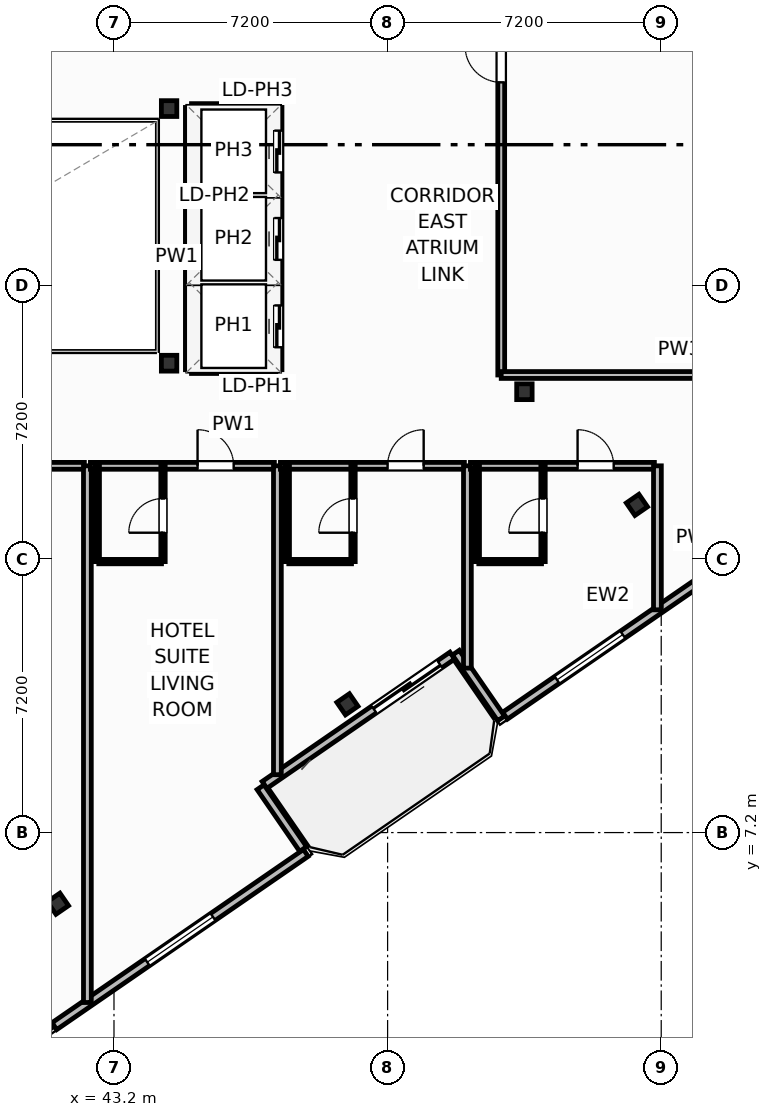
"""IFC4 building model, lengths in metres.
Left out: names, types, materials, properties, quantities, classifications, styles, units other than length and angle.
Written with IfcOpenShell. Run it as: python <this file> out.ifc"""

import sys

from ifc_helpers import new_model, si_unit, direction, frame, frame_2d, origin, origin_2d, place, context, subcontext, project, spatial, rectangle, i_section, extrude, element, fill, save


model = new_model("IFC4")
c1 = context("Model", 3, precision=1e-05, world=origin(), true_north=direction((0.0, 1.0)))
c2 = subcontext(c1, "Body", "Model", "MODEL_VIEW")
j1 = project(units=[si_unit("LENGTHUNIT", "METRE"), si_unit("PLANEANGLEUNIT", "RADIAN")], contexts=[c1])
p1 = place(None, origin())
s1 = spatial("IfcSite", under=j1, at=p1, CompositionType="ELEMENT")
p2 = place(p1, origin())
s2 = spatial("IfcBuilding", under=s1, at=p2, CompositionType="ELEMENT")
p3 = place(p2, frame((0.0, 0.0, 280.4)))
s3 = spatial("IfcBuildingStorey", under=s2, at=p3, CompositionType="ELEMENT", Elevation=280.4)
for number, where, z_axis, x_axis in (
    (1, (44.65, 19.55, 0.0), (0.0, 0.0, 1.0), (1.0, 0.0, 0.0)),
    (2, (44.65, 26.25, 0.0), (0.0, 0.0, 1.0), (1.0, 0.0, 0.0)),
    (3, (54.0, 18.8, 0.0), (0.0, 0.0, 1.0), (1.0, 0.0, 0.0)),
):
    element("IfcColumn", number, at=place(p3, frame(where, z_axis=z_axis, x_axis=x_axis)), inside=s3, PredefinedType="COLUMN", context=c2, shape_type="SweptSolid", body=[
        extrude(i_section(OverallWidth=0.406, OverallDepth=0.416, WebThickness=0.03, FlangeThickness=0.048, FilletRadius=0.025, at=origin_2d()), origin(), (0.0, 0.0, 1.0), 3.7),
    ])
for number, where, z_axis, x_axis in (
    (4, (41.725, 5.328, 0.0), (0.0, 0.0, 1.0), (0.824, 0.567, 0.0)),
    (5, (49.343, 10.575, 0.0), (0.0, 0.0, 1.0), (0.824, 0.567, 0.0)),
    (6, (56.96, 15.823, 0.0), (0.0, 0.0, 1.0), (0.824, 0.567, 0.0)),
):
    element("IfcColumn", number, at=place(p3, frame(where, z_axis=z_axis, x_axis=x_axis)), inside=s3, PredefinedType="COLUMN", context=c2, shape_type="SweptSolid", body=[
        extrude(i_section(OverallWidth=0.401, OverallDepth=0.399, WebThickness=0.025, FlangeThickness=0.04, FilletRadius=0.022, at=origin_2d()), origin(), (0.0, 0.0, 1.0), 3.7),
    ])
p4 = place(p3, frame((52.103, 11.857, 0.0), z_axis=(0.0, 0.0, 1.0), x_axis=(-0.823534636215, -0.567265989598, 0.0)))
e7 = element("IfcWall", 7, at=p4, inside=s3, PredefinedType="SOLIDWALL", context=c2, shape_type="SweptSolid", body=[
    extrude(rectangle(XDim=6.0, YDim=0.22, at=frame_2d((3.0, 0.0))), origin(), (0.0, 0.0, 1.0), 2.73),
])
p5 = place(p4, frame((0.4, 0.0, 0.0)))
e8 = element("IfcOpeningElement", 8, at=p5, cuts=e7, PredefinedType="OPENING", context=c2, shape_type="SweptSolid", body=[
    extrude(rectangle(XDim=2.1, YDim=2.3, at=frame_2d((1.05, 1.15))), frame((0.0, 0.12, 0.0), z_axis=(0.0, -1.0, 0.0), x_axis=(1.0, 0.0, 0.0)), (0.0, 0.0, 1.0), 0.24),
])
p6 = place(p3, frame((40.337, 3.765, 0.0), z_axis=(0.0, 0.0, 1.0), x_axis=(0.567352541689, -0.823475010816, 0.0)))
e9 = element("IfcWall", 9, at=p6, inside=s3, PredefinedType="SOLIDWALL", context=c2, shape_type="SweptSolid", body=[
    extrude(rectangle(XDim=2.1, YDim=0.22, at=frame_2d((1.05, 0.0))), origin(), (0.0, 0.0, 1.0), 2.73),
])
p7 = place(p3, frame((41.631, 2.106, 0.0), z_axis=(0.0, 0.0, 1.0), x_axis=(0.823530942962, 0.56727135128, 0.0)))
e10 = element("IfcWall", 10, at=p7, inside=s3, PredefinedType="SOLIDWALL", context=c2, shape_type="SweptSolid", body=[
    extrude(rectangle(XDim=8.035, YDim=0.22, at=frame_2d((4.018, 0.0))), origin(), (0.0, 0.0, 1.0), 2.73),
])
p8 = place(p7, frame((2.968, 0.0, 0.8)))
e11 = element("IfcOpeningElement", 11, at=p8, cuts=e10, PredefinedType="OPENING", context=c2, shape_type="SweptSolid", body=[
    extrude(rectangle(XDim=2.1, YDim=1.75, at=frame_2d((1.05, 0.875))), frame((0.0, 0.12, 0.0), z_axis=(0.0, -1.0, 0.0), x_axis=(1.0, 0.0, 0.0)), (0.0, 0.0, 1.0), 0.24),
])
p9 = place(p3, frame((48.177, 6.767, 0.0), z_axis=(0.0, 0.0, 1.0), x_axis=(-0.567273565974, 0.823529417415, 0.0)))
e12 = element("IfcWall", 12, at=p9, inside=s3, PredefinedType="SOLIDWALL", context=c2, shape_type="SweptSolid", body=[
    extrude(rectangle(XDim=1.975, YDim=0.22, at=frame_2d((0.988, 0.0))), origin(), (0.0, 0.0, 1.0), 2.73),
])
p10 = place(p3, frame((52.196, 11.933, 0.0), z_axis=(0.0, 0.0, 1.0), x_axis=(0.56729822855, -0.823512428494, 0.0)))
e13 = element("IfcWall", 13, at=p10, inside=s3, PredefinedType="SOLIDWALL", context=c2, shape_type="SweptSolid", body=[
    extrude(rectangle(XDim=2.1, YDim=0.22, at=frame_2d((1.05, 0.0))), origin(), (0.0, 0.0, 1.0), 2.73),
])
p11 = place(p3, frame((53.49, 10.275, 0.0), z_axis=(0.0, 0.0, 1.0), x_axis=(0.823530942962, 0.56727135128, 0.0)))
e14 = element("IfcWall", 14, at=p11, inside=s3, PredefinedType="SOLIDWALL", context=c2, shape_type="SweptSolid", body=[
    extrude(rectangle(XDim=8.035, YDim=0.22, at=frame_2d((4.018, 0.0))), origin(), (0.0, 0.0, 1.0), 2.73),
])
p12 = place(p11, frame((1.662, 0.0, 0.8)))
e15 = element("IfcOpeningElement", 15, at=p12, cuts=e14, PredefinedType="OPENING", context=c2, shape_type="SweptSolid", body=[
    extrude(rectangle(XDim=2.1, YDim=1.75, at=frame_2d((1.05, 0.875))), frame((0.0, 0.12, 0.0), z_axis=(0.0, -1.0, 0.0), x_axis=(1.0, 0.0, 0.0)), (0.0, 0.0, 1.0), 0.24),
])
p13 = place(p3, frame((37.58, 16.85, 0.0), z_axis=(0.0, 0.0, 1.0), x_axis=(1.0, 0.0, 0.0)))
e16 = element("IfcWall", 16, at=p13, inside=s3, PredefinedType="PARTITIONING", context=c2, shape_type="SweptSolid", body=[
    extrude(rectangle(XDim=4.84, YDim=0.18, at=frame_2d((2.42, 0.0))), origin(), (0.0, 0.0, 1.0), 3.45),
])
p14 = place(p13, frame((2.819, 0.0, 0.0)))
e17 = element("IfcOpeningElement", 17, at=p14, cuts=e16, PredefinedType="OPENING", context=c2, shape_type="SweptSolid", body=[
    extrude(rectangle(XDim=0.95, YDim=2.15, at=frame_2d((0.475, 1.075))), frame((0.0, 0.1, 0.0), z_axis=(0.0, -1.0, 0.0), x_axis=(1.0, 0.0, 0.0)), (0.0, 0.0, 1.0), 0.2),
])
p15 = place(p3, frame((42.5, 2.729, 0.0), z_axis=(0.0, 0.0, 1.0), x_axis=(0.0, 1.0, 0.0)))
e18 = element("IfcWall", 18, at=p15, inside=s3, PredefinedType="PARTITIONING", context=c2, shape_type="SweptSolid", body=[
    extrude(rectangle(XDim=14.121, YDim=0.205, at=frame_2d((7.061, 0.0))), origin(), (0.0, 0.0, 1.0), 2.739),
])
p16 = place(p3, frame((42.58, 16.85, 0.0), z_axis=(0.0, 0.0, 1.0), x_axis=(1.0, 0.0, 0.0)))
e19 = element("IfcWall", 19, at=p16, inside=s3, PredefinedType="PARTITIONING", context=c2, shape_type="SweptSolid", body=[
    extrude(rectangle(XDim=4.84, YDim=0.18, at=frame_2d((2.42, 0.0))), origin(), (0.0, 0.0, 1.0), 3.45),
])
p17 = place(p16, frame((2.819, 0.0, 0.0)))
e20 = element("IfcOpeningElement", 20, at=p17, cuts=e19, PredefinedType="OPENING", context=c2, shape_type="SweptSolid", body=[
    extrude(rectangle(XDim=0.95, YDim=2.15, at=frame_2d((0.475, 1.075))), frame((0.0, 0.1, 0.0), z_axis=(0.0, -1.0, 0.0), x_axis=(1.0, 0.0, 0.0)), (0.0, 0.0, 1.0), 0.2),
])
p18 = place(p3, frame((42.8, 14.33, 0.0), z_axis=(0.0, 0.0, 1.0), x_axis=(1.0, 0.0, 0.0)))
e21 = element("IfcWall", 21, at=p18, inside=s3, PredefinedType="PARTITIONING", context=c2, shape_type="SweptSolid", body=[
    extrude(rectangle(XDim=1.65, YDim=0.115, at=frame_2d((0.825, 0.0))), origin(), (0.0, 0.0, 1.0), 3.45),
])
p19 = place(p3, frame((44.49, 14.33, 0.0), z_axis=(0.0, 0.0, 1.0), x_axis=(0.0, 1.0, 0.0)))
e22 = element("IfcWall", 22, at=p19, inside=s3, PredefinedType="PARTITIONING", context=c2, shape_type="SweptSolid", body=[
    extrude(rectangle(XDim=2.52, YDim=0.115, at=frame_2d((1.26, 0.0))), origin(), (0.0, 0.0, 1.0), 3.45),
])
p20 = place(p19, frame((0.76, 0.0, 0.0)))
e23 = element("IfcOpeningElement", 23, at=p20, cuts=e22, PredefinedType="OPENING", context=c2, shape_type="SweptSolid", body=[
    extrude(rectangle(XDim=0.9, YDim=2.05, at=frame_2d((0.45, 1.025))), frame((0.0, 0.067, 0.0), z_axis=(0.0, -1.0, 0.0), x_axis=(1.0, 0.0, 0.0)), (0.0, 0.0, 1.0), 0.135),
])
p21 = place(p3, frame((42.76, 14.33, 0.0), z_axis=(0.0, 0.0, 1.0), x_axis=(0.0, 1.0, 0.0)))
e24 = element("IfcWall", 24, at=p21, inside=s3, PredefinedType="PARTITIONING", context=c2, shape_type="SweptSolid", body=[
    extrude(rectangle(XDim=2.52, YDim=0.115, at=frame_2d((1.26, 0.0))), origin(), (0.0, 0.0, 1.0), 3.45),
])
p22 = place(p3, frame((47.5, 8.723, 0.0), z_axis=(0.0, 0.0, 1.0), x_axis=(0.0, 1.0, 0.0)))
e25 = element("IfcWall", 25, at=p22, inside=s3, PredefinedType="PARTITIONING", context=c2, shape_type="SweptSolid", body=[
    extrude(rectangle(XDim=8.127, YDim=0.205, at=frame_2d((4.063, 0.0))), origin(), (0.0, 0.0, 1.0), 3.45),
])
p23 = place(p3, frame((47.58, 16.85, 0.0), z_axis=(0.0, 0.0, 1.0), x_axis=(1.0, 0.0, 0.0)))
e26 = element("IfcWall", 26, at=p23, inside=s3, PredefinedType="PARTITIONING", context=c2, shape_type="SweptSolid", body=[
    extrude(rectangle(XDim=4.84, YDim=0.18, at=frame_2d((2.42, 0.0))), origin(), (0.0, 0.0, 1.0), 3.45),
])
p24 = place(p23, frame((2.819, 0.0, 0.0)))
e27 = element("IfcOpeningElement", 27, at=p24, cuts=e26, PredefinedType="OPENING", context=c2, shape_type="SweptSolid", body=[
    extrude(rectangle(XDim=0.95, YDim=2.15, at=frame_2d((0.475, 1.075))), frame((0.0, 0.1, 0.0), z_axis=(0.0, -1.0, 0.0), x_axis=(1.0, 0.0, 0.0)), (0.0, 0.0, 1.0), 0.2),
])
p25 = place(p3, frame((47.8, 14.33, 0.0), z_axis=(0.0, 0.0, 1.0), x_axis=(1.0, 0.0, 0.0)))
e28 = element("IfcWall", 28, at=p25, inside=s3, PredefinedType="PARTITIONING", context=c2, shape_type="SweptSolid", body=[
    extrude(rectangle(XDim=1.65, YDim=0.115, at=frame_2d((0.825, 0.0))), origin(), (0.0, 0.0, 1.0), 3.45),
])
p26 = place(p3, frame((49.49, 14.33, 0.0), z_axis=(0.0, 0.0, 1.0), x_axis=(0.0, 1.0, 0.0)))
e29 = element("IfcWall", 29, at=p26, inside=s3, PredefinedType="PARTITIONING", context=c2, shape_type="SweptSolid", body=[
    extrude(rectangle(XDim=2.52, YDim=0.115, at=frame_2d((1.26, 0.0))), origin(), (0.0, 0.0, 1.0), 3.45),
])
p27 = place(p26, frame((0.76, 0.0, 0.0)))
e30 = element("IfcOpeningElement", 30, at=p27, cuts=e29, PredefinedType="OPENING", context=c2, shape_type="SweptSolid", body=[
    extrude(rectangle(XDim=0.9, YDim=2.05, at=frame_2d((0.45, 1.025))), frame((0.0, 0.067, 0.0), z_axis=(0.0, -1.0, 0.0), x_axis=(1.0, 0.0, 0.0)), (0.0, 0.0, 1.0), 0.135),
])
p28 = place(p3, frame((47.76, 14.33, 0.0), z_axis=(0.0, 0.0, 1.0), x_axis=(0.0, 1.0, 0.0)))
e31 = element("IfcWall", 31, at=p28, inside=s3, PredefinedType="PARTITIONING", context=c2, shape_type="SweptSolid", body=[
    extrude(rectangle(XDim=2.52, YDim=0.115, at=frame_2d((1.26, 0.0))), origin(), (0.0, 0.0, 1.0), 3.45),
])
p29 = place(p3, frame((52.5, 11.527, 0.0), z_axis=(0.0, 0.0, 1.0), x_axis=(0.0, 1.0, 0.0)))
e32 = element("IfcWall", 32, at=p29, inside=s3, PredefinedType="PARTITIONING", context=c2, shape_type="SweptSolid", body=[
    extrude(rectangle(XDim=5.323, YDim=0.205, at=frame_2d((2.662, 0.0))), origin(), (0.0, 0.0, 1.0), 3.45),
])
p30 = place(p3, frame((52.58, 16.85, 0.0), z_axis=(0.0, 0.0, 1.0), x_axis=(1.0, 0.0, 0.0)))
e33 = element("IfcWall", 33, at=p30, inside=s3, PredefinedType="PARTITIONING", context=c2, shape_type="SweptSolid", body=[
    extrude(rectangle(XDim=4.84, YDim=0.18, at=frame_2d((2.42, 0.0))), origin(), (0.0, 0.0, 1.0), 3.45),
])
p31 = place(p30, frame((2.819, 0.0, 0.0)))
e34 = element("IfcOpeningElement", 34, at=p31, cuts=e33, PredefinedType="OPENING", context=c2, shape_type="SweptSolid", body=[
    extrude(rectangle(XDim=0.95, YDim=2.15, at=frame_2d((0.475, 1.075))), frame((0.0, 0.1, 0.0), z_axis=(0.0, -1.0, 0.0), x_axis=(1.0, 0.0, 0.0)), (0.0, 0.0, 1.0), 0.2),
])
p32 = place(p3, frame((52.8, 14.33, 0.0), z_axis=(0.0, 0.0, 1.0), x_axis=(1.0, 0.0, 0.0)))
e35 = element("IfcWall", 35, at=p32, inside=s3, PredefinedType="PARTITIONING", context=c2, shape_type="SweptSolid", body=[
    extrude(rectangle(XDim=1.65, YDim=0.115, at=frame_2d((0.825, 0.0))), origin(), (0.0, 0.0, 1.0), 3.45),
])
p33 = place(p3, frame((54.49, 14.33, 0.0), z_axis=(0.0, 0.0, 1.0), x_axis=(0.0, 1.0, 0.0)))
e36 = element("IfcWall", 36, at=p33, inside=s3, PredefinedType="PARTITIONING", context=c2, shape_type="SweptSolid", body=[
    extrude(rectangle(XDim=2.52, YDim=0.115, at=frame_2d((1.26, 0.0))), origin(), (0.0, 0.0, 1.0), 3.45),
])
p34 = place(p33, frame((0.76, 0.0, 0.0)))
e37 = element("IfcOpeningElement", 37, at=p34, cuts=e36, PredefinedType="OPENING", context=c2, shape_type="SweptSolid", body=[
    extrude(rectangle(XDim=0.9, YDim=2.05, at=frame_2d((0.45, 1.025))), frame((0.0, 0.067, 0.0), z_axis=(0.0, -1.0, 0.0), x_axis=(1.0, 0.0, 0.0)), (0.0, 0.0, 1.0), 0.135),
])
p35 = place(p3, frame((52.76, 14.33, 0.0), z_axis=(0.0, 0.0, 1.0), x_axis=(0.0, 1.0, 0.0)))
e38 = element("IfcWall", 38, at=p35, inside=s3, PredefinedType="PARTITIONING", context=c2, shape_type="SweptSolid", body=[
    extrude(rectangle(XDim=2.52, YDim=0.115, at=frame_2d((1.26, 0.0))), origin(), (0.0, 0.0, 1.0), 3.45),
])
p36 = place(p3, frame((57.5, 13.061, 0.0), z_axis=(0.0, 0.0, 1.0), x_axis=(0.0, 1.0, 0.0)))
e39 = element("IfcWall", 39, at=p36, inside=s3, PredefinedType="PARTITIONING", context=c2, shape_type="SweptSolid", body=[
    extrude(rectangle(XDim=3.789, YDim=0.205, at=frame_2d((1.895, 0.0))), origin(), (0.0, 0.0, 1.0), 3.45),
])
p37 = place(p3, frame((53.39, 19.24, 0.0), z_axis=(0.0, 0.0, 1.0), x_axis=(0.0, 1.0, 0.0)))
e40 = element("IfcWall", 40, at=p37, inside=s3, PredefinedType="PARTITIONING", context=c2, shape_type="SweptSolid", body=[
    extrude(rectangle(XDim=20.06, YDim=0.18, at=frame_2d((10.03, 0.0))), origin(), (0.0, 0.0, 1.0), 3.45),
])
p38 = place(p37, frame((7.7, 0.0, 0.0)))
e41 = element("IfcOpeningElement", 41, at=p38, cuts=e40, PredefinedType="OPENING", context=c2, shape_type="SweptSolid", body=[
    extrude(rectangle(XDim=0.95, YDim=2.05, at=frame_2d((0.475, 1.025))), frame((0.0, 0.1, 0.0), z_axis=(0.0, -1.0, 0.0), x_axis=(1.0, 0.0, 0.0)), (0.0, 0.0, 1.0), 0.2),
])
p39 = place(p3, frame((53.39, 19.24, 0.0), z_axis=(0.0, 0.0, 1.0), x_axis=(1.0, 0.0, 0.0)))
e42 = element("IfcWall", 42, at=p39, inside=s3, PredefinedType="PARTITIONING", context=c2, shape_type="SweptSolid", body=[
    extrude(rectangle(XDim=9.378, YDim=0.18, at=frame_2d((4.689, 0.0))), origin(), (0.0, 0.0, 1.0), 2.739),
])
for number, where, z_axis, x_axis in (
    (43, (45.24, 21.675, 0.0), (0.0, 0.0, 1.0), (1.0, 0.0, 0.0)),
    (44, (45.24, 23.975, 0.0), (0.0, 0.0, 1.0), (1.0, 0.0, 0.0)),
):
    element("IfcWall", number, at=place(p3, frame(where, z_axis=z_axis, x_axis=x_axis)), inside=s3, PredefinedType="PARTITIONING", context=c2, shape_type="SweptSolid", body=[
        extrude(rectangle(XDim=2.22, YDim=0.2, at=frame_2d((1.11, 0.0))), origin(), (0.0, 0.0, 1.0), 3.45),
    ])
p40 = place(p3, frame((45.24, 19.38, 0.0), z_axis=(0.0, 0.0, 1.0), x_axis=(1.0, 0.0, 0.0)))
e45 = element("IfcWall", 45, at=p40, inside=s3, PredefinedType="PARTITIONING", context=c2, shape_type="SweptSolid", body=[
    extrude(rectangle(XDim=2.22, YDim=0.2, at=frame_2d((1.11, 0.0))), origin(), (0.0, 0.0, 1.0), 2.662),
])
p41 = place(p3, frame((45.24, 26.28, 0.0), z_axis=(0.0, 0.0, 1.0), x_axis=(1.0, 0.0, 0.0)))
e46 = element("IfcWall", 46, at=p41, inside=s3, PredefinedType="PARTITIONING", context=c2, shape_type="SweptSolid", body=[
    extrude(rectangle(XDim=2.22, YDim=0.2, at=frame_2d((1.11, 0.0))), origin(), (0.0, 0.0, 1.0), 3.45),
])
p42 = place(p3, frame((45.18, 19.38, 0.0), z_axis=(0.0, 0.0, 1.0), x_axis=(0.0, 1.0, 0.0)))
e47 = element("IfcWall", 47, at=p42, inside=s3, PredefinedType="PARTITIONING", context=c2, shape_type="SweptSolid", body=[
    extrude(rectangle(XDim=6.9, YDim=0.2, at=frame_2d((3.45, 0.0))), origin(), (0.0, 0.0, 1.0), 3.45),
])
p43 = place(p3, frame((47.52, 19.38, 0.0), z_axis=(0.0, 0.0, 1.0), x_axis=(0.0, 1.0, 0.0)))
e48 = element("IfcWall", 48, at=p43, inside=s3, PredefinedType="PARTITIONING", context=c2, shape_type="SweptSolid", body=[
    extrude(rectangle(XDim=6.9, YDim=0.2, at=frame_2d((3.45, 0.0))), origin(), (0.0, 0.0, 1.0), 3.45),
])
p44 = place(p43, frame((0.59, 0.0, 0.0)))
e49 = element("IfcOpeningElement", 49, at=p44, cuts=e48, PredefinedType="OPENING", context=c2, shape_type="SweptSolid", body=[
    extrude(rectangle(XDim=1.1, YDim=2.15, at=frame_2d((0.55, 1.075))), frame((0.0, 0.11, 0.0), z_axis=(0.0, -1.0, 0.0), x_axis=(1.0, 0.0, 0.0)), (0.0, 0.0, 1.0), 0.22),
])
p45 = place(p43, frame((2.89, 0.0, 0.0)))
e50 = element("IfcOpeningElement", 50, at=p45, cuts=e48, PredefinedType="OPENING", context=c2, shape_type="SweptSolid", body=[
    extrude(rectangle(XDim=1.1, YDim=2.15, at=frame_2d((0.55, 1.075))), frame((0.0, 0.11, 0.0), z_axis=(0.0, -1.0, 0.0), x_axis=(1.0, 0.0, 0.0)), (0.0, 0.0, 1.0), 0.22),
])
p46 = place(p43, frame((5.19, 0.0, 0.0)))
e51 = element("IfcOpeningElement", 51, at=p46, cuts=e48, PredefinedType="OPENING", context=c2, shape_type="SweptSolid", body=[
    extrude(rectangle(XDim=1.1, YDim=2.15, at=frame_2d((0.55, 1.075))), frame((0.0, 0.11, 0.0), z_axis=(0.0, -1.0, 0.0), x_axis=(1.0, 0.0, 0.0)), (0.0, 0.0, 1.0), 0.22),
])
p47 = place(p5, origin())
e52 = element("IfcDoor", 52, at=p47, inside=s3, OperationType="SLIDING_TO_LEFT", PredefinedType="DOOR", context=c2, shape_type="SweptSolid", body=[
    extrude(rectangle(XDim=2.1, YDim=2.3, at=frame_2d((1.05, 1.15))), frame((0.0, 0.025, 0.0), z_axis=(0.0, -1.0, 0.0), x_axis=(1.0, 0.0, 0.0)), (0.0, 0.0, 1.0), 0.05),
])
fill(e8, e52)
p48 = place(p8, origin())
e53 = element("IfcWindow", 53, at=p48, inside=s3, PartitioningType="SINGLE_PANEL", PredefinedType="WINDOW", context=c2, shape_type="SweptSolid", body=[
    extrude(rectangle(XDim=2.1, YDim=1.75, at=frame_2d((1.05, 0.875))), frame((0.0, 0.03, 0.0), z_axis=(0.0, -1.0, 0.0), x_axis=(1.0, 0.0, 0.0)), (0.0, 0.0, 1.0), 0.06),
])
fill(e11, e53)
p49 = place(p12, origin())
e54 = element("IfcWindow", 54, at=p49, inside=s3, PartitioningType="SINGLE_PANEL", PredefinedType="WINDOW", context=c2, shape_type="SweptSolid", body=[
    extrude(rectangle(XDim=2.1, YDim=1.75, at=frame_2d((1.05, 0.875))), frame((0.0, 0.03, 0.0), z_axis=(0.0, -1.0, 0.0), x_axis=(1.0, 0.0, 0.0)), (0.0, 0.0, 1.0), 0.06),
])
fill(e15, e54)
p50 = place(p17, origin())
e55 = element("IfcDoor", 55, at=p50, inside=s3, OperationType="SINGLE_SWING_LEFT", PredefinedType="DOOR", context=c2, shape_type="SweptSolid", body=[
    extrude(rectangle(XDim=0.95, YDim=2.15, at=frame_2d((0.475, 1.075))), frame((0.0, 0.025, 0.0), z_axis=(0.0, -1.0, 0.0), x_axis=(1.0, 0.0, 0.0)), (0.0, 0.0, 1.0), 0.05),
])
fill(e20, e55)
p51 = place(p20, origin())
e56 = element("IfcDoor", 56, at=p51, inside=s3, OperationType="SINGLE_SWING_LEFT", PredefinedType="DOOR", context=c2, shape_type="SweptSolid", body=[
    extrude(rectangle(XDim=0.9, YDim=2.05, at=frame_2d((0.45, 1.025))), frame((0.0, 0.025, 0.0), z_axis=(0.0, -1.0, 0.0), x_axis=(1.0, 0.0, 0.0)), (0.0, 0.0, 1.0), 0.05),
])
fill(e23, e56)
p52 = place(p24, origin())
e57 = element("IfcDoor", 57, at=p52, inside=s3, OperationType="SINGLE_SWING_RIGHT", PredefinedType="DOOR", context=c2, shape_type="SweptSolid", body=[
    extrude(rectangle(XDim=0.95, YDim=2.15, at=frame_2d((0.475, 1.075))), frame((0.0, 0.025, 0.0), z_axis=(0.0, -1.0, 0.0), x_axis=(1.0, 0.0, 0.0)), (0.0, 0.0, 1.0), 0.05),
])
fill(e27, e57)
p53 = place(p27, origin())
e58 = element("IfcDoor", 58, at=p53, inside=s3, OperationType="SINGLE_SWING_LEFT", PredefinedType="DOOR", context=c2, shape_type="SweptSolid", body=[
    extrude(rectangle(XDim=0.9, YDim=2.05, at=frame_2d((0.45, 1.025))), frame((0.0, 0.025, 0.0), z_axis=(0.0, -1.0, 0.0), x_axis=(1.0, 0.0, 0.0)), (0.0, 0.0, 1.0), 0.05),
])
fill(e30, e58)
p54 = place(p31, origin())
e59 = element("IfcDoor", 59, at=p54, inside=s3, OperationType="SINGLE_SWING_LEFT", PredefinedType="DOOR", context=c2, shape_type="SweptSolid", body=[
    extrude(rectangle(XDim=0.95, YDim=2.15, at=frame_2d((0.475, 1.075))), frame((0.0, 0.025, 0.0), z_axis=(0.0, -1.0, 0.0), x_axis=(1.0, 0.0, 0.0)), (0.0, 0.0, 1.0), 0.05),
])
fill(e34, e59)
p55 = place(p34, origin())
e60 = element("IfcDoor", 60, at=p55, inside=s3, OperationType="SINGLE_SWING_LEFT", PredefinedType="DOOR", context=c2, shape_type="SweptSolid", body=[
    extrude(rectangle(XDim=0.9, YDim=2.05, at=frame_2d((0.45, 1.025))), frame((0.0, 0.025, 0.0), z_axis=(0.0, -1.0, 0.0), x_axis=(1.0, 0.0, 0.0)), (0.0, 0.0, 1.0), 0.05),
])
fill(e37, e60)
p56 = place(p38, origin())
e61 = element("IfcDoor", 61, at=p56, inside=s3, OperationType="SINGLE_SWING_RIGHT", PredefinedType="DOOR", context=c2, shape_type="SweptSolid", body=[
    extrude(rectangle(XDim=0.95, YDim=2.05, at=frame_2d((0.475, 1.025))), frame((0.0, 0.025, 0.0), z_axis=(0.0, -1.0, 0.0), x_axis=(1.0, 0.0, 0.0)), (0.0, 0.0, 1.0), 0.05),
])
fill(e41, e61)
p57 = place(p44, origin())
e62 = element("IfcDoor", 62, at=p57, inside=s3, OperationType="SLIDING_TO_LEFT", PredefinedType="DOOR", context=c2, shape_type="SweptSolid", body=[
    extrude(rectangle(XDim=1.1, YDim=2.15, at=frame_2d((0.55, 1.075))), frame((0.0, 0.025, 0.0), z_axis=(0.0, -1.0, 0.0), x_axis=(1.0, 0.0, 0.0)), (0.0, 0.0, 1.0), 0.05),
])
fill(e49, e62)
p58 = place(p45, origin())
e63 = element("IfcDoor", 63, at=p58, inside=s3, OperationType="SLIDING_TO_LEFT", PredefinedType="DOOR", context=c2, shape_type="SweptSolid", body=[
    extrude(rectangle(XDim=1.1, YDim=2.15, at=frame_2d((0.55, 1.075))), frame((0.0, 0.025, 0.0), z_axis=(0.0, -1.0, 0.0), x_axis=(1.0, 0.0, 0.0)), (0.0, 0.0, 1.0), 0.05),
])
fill(e50, e63)
p59 = place(p46, origin())
e64 = element("IfcDoor", 64, at=p59, inside=s3, OperationType="SLIDING_TO_LEFT", PredefinedType="DOOR", context=c2, shape_type="SweptSolid", body=[
    extrude(rectangle(XDim=1.1, YDim=2.15, at=frame_2d((0.55, 1.075))), frame((0.0, 0.025, 0.0), z_axis=(0.0, -1.0, 0.0), x_axis=(1.0, 0.0, 0.0)), (0.0, 0.0, 1.0), 0.05),
])
fill(e51, e64)
save(model, sys.argv[1])
